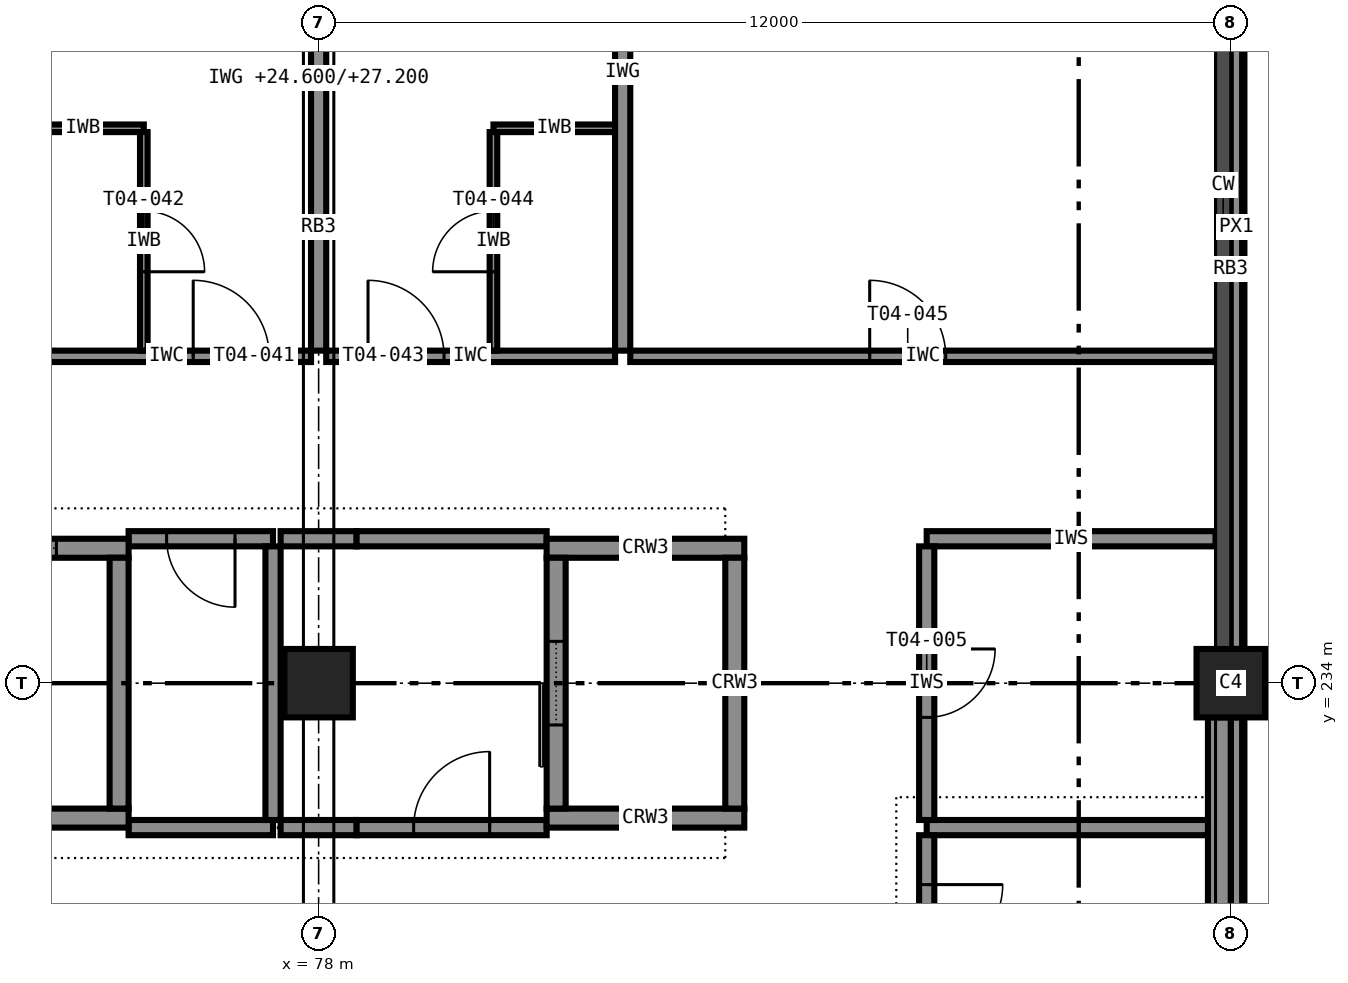
"""IFC4 building model, lengths in metres.
Left out: names, types, materials, properties, quantities, classifications, styles, units other than length and angle.
Written with IfcOpenShell. Run it as: python <this file> out.ifc"""

import sys

from ifc_helpers import new_model, si_unit, direction, frame, frame_2d, origin, origin_2d, place, context, subcontext, project, spatial, rectangle, extrude, element, fill, save


model = new_model("IFC4")
c1 = context("Model", 3, precision=1e-05, world=origin(), true_north=direction((0.0, 1.0)))
c2 = subcontext(c1, "Body", "Model", "MODEL_VIEW")
j1 = project(units=[si_unit("LENGTHUNIT", "METRE"), si_unit("PLANEANGLEUNIT", "RADIAN")], contexts=[c1])
p1 = place(None, origin())
s1 = spatial("IfcSite", under=j1, at=p1, CompositionType="ELEMENT")
p2 = place(p1, origin())
s2 = spatial("IfcBuilding", under=s1, at=p2, CompositionType="ELEMENT")
p3 = place(p2, frame((0.0, 0.0, 24.6)))
s3 = spatial("IfcBuildingStorey", under=s2, at=p3, CompositionType="ELEMENT", Elevation=24.6)
for number, where, z_axis, x_axis in (
    (1, (78.0, 234.0, 0.0), (0.0, 0.0, 1.0), (1.0, 0.0, 0.0)),
    (2, (90.0, 234.0, 0.0), (0.0, 0.0, 1.0), (1.0, 0.0, 0.0)),
):
    element("IfcColumn", number, at=place(p3, frame(where, z_axis=z_axis, x_axis=x_axis)), inside=s3, PredefinedType="COLUMN", context=c2, shape_type="SweptSolid", body=[
        extrude(rectangle(XDim=0.9, YDim=0.9, at=origin_2d()), origin(), (0.0, 0.0, 1.0), 3.6),
    ])
p4 = place(p3, frame((72.5, 232.225, 0.0), z_axis=(0.0, 0.0, 1.0), x_axis=(1.0, 0.0, 0.0)))
e3 = element("IfcWall", 3, at=p4, inside=s3, PredefinedType="SHEAR", context=c2, shape_type="SweptSolid", body=[
    extrude(rectangle(XDim=3.0, YDim=0.25, at=frame_2d((1.5, 0.0))), origin(), (0.0, 0.0, 1.0), 3.6),
])
p5 = place(p3, frame((72.5, 235.775, 0.0), z_axis=(0.0, 0.0, 1.0), x_axis=(1.0, 0.0, 0.0)))
e4 = element("IfcWall", 4, at=p5, inside=s3, PredefinedType="SHEAR", context=c2, shape_type="SweptSolid", body=[
    extrude(rectangle(XDim=3.0, YDim=0.25, at=frame_2d((1.5, 0.0))), origin(), (0.0, 0.0, 1.0), 3.6),
])
p6 = place(p5, frame((0.95, 0.0, 0.0)))
e5 = element("IfcOpeningElement", 5, at=p6, cuts=e4, PredefinedType="OPENING", context=c2, shape_type="SweptSolid", body=[
    extrude(rectangle(XDim=1.1, YDim=2.1, at=frame_2d((0.55, 1.05))), frame((0.0, 0.135, 0.0), z_axis=(0.0, -1.0, 0.0), x_axis=(1.0, 0.0, 0.0)), (0.0, 0.0, 1.0), 0.27),
])
p7 = place(p3, frame((75.375, 232.35, 0.0), z_axis=(0.0, 0.0, 1.0), x_axis=(0.0, 1.0, 0.0)))
e6 = element("IfcWall", 6, at=p7, inside=s3, PredefinedType="SHEAR", context=c2, shape_type="SweptSolid", body=[
    extrude(rectangle(XDim=3.3, YDim=0.25, at=frame_2d((1.65, 0.0))), origin(), (0.0, 0.0, 1.0), 3.6),
])
for number, where, z_axis, x_axis in (
    (7, (81.0, 232.225, 0.0), (0.0, 0.0, 1.0), (1.0, 0.0, 0.0)),
    (8, (81.0, 235.775, 0.0), (0.0, 0.0, 1.0), (1.0, 0.0, 0.0)),
):
    element("IfcWall", number, at=place(p3, frame(where, z_axis=z_axis, x_axis=x_axis)), inside=s3, PredefinedType="SHEAR", context=c2, shape_type="SweptSolid", body=[
        extrude(rectangle(XDim=2.6, YDim=0.25, at=frame_2d((1.3, 0.0))), origin(), (0.0, 0.0, 1.0), 3.6),
    ])
p8 = place(p3, frame((81.125, 232.35, 0.0), z_axis=(0.0, 0.0, 1.0), x_axis=(0.0, 1.0, 0.0)))
e9 = element("IfcWall", 9, at=p8, inside=s3, PredefinedType="SHEAR", context=c2, shape_type="SweptSolid", body=[
    extrude(rectangle(XDim=3.3, YDim=0.25, at=frame_2d((1.65, 0.0))), origin(), (0.0, 0.0, 1.0), 3.6),
])
p9 = place(p8, frame((1.1, 0.0, 0.0)))
e10 = element("IfcOpeningElement", 10, at=p9, cuts=e9, PredefinedType="OPENING", context=c2, shape_type="SweptSolid", body=[
    extrude(rectangle(XDim=1.1, YDim=2.1, at=frame_2d((0.55, 1.05))), frame((0.0, 0.135, 0.0), z_axis=(0.0, -1.0, 0.0), x_axis=(1.0, 0.0, 0.0)), (0.0, 0.0, 1.0), 0.27),
])
p10 = place(p3, frame((83.475, 232.35, 0.0), z_axis=(0.0, 0.0, 1.0), x_axis=(0.0, 1.0, 0.0)))
e11 = element("IfcWall", 11, at=p10, inside=s3, PredefinedType="SHEAR", context=c2, shape_type="SweptSolid", body=[
    extrude(rectangle(XDim=3.3, YDim=0.25, at=frame_2d((1.65, 0.0))), origin(), (0.0, 0.0, 1.0), 3.6),
])
p11 = place(p3, frame((89.85, 222.45, 0.0), z_axis=(0.0, 0.0, 1.0), x_axis=(0.0, 1.0, 0.0)))
e12 = element("IfcWall", 12, at=p11, inside=s3, PredefinedType="STANDARD", context=c2, shape_type="SweptSolid", body=[
    extrude(rectangle(XDim=11.1, YDim=0.3, at=frame_2d((5.55, 0.0))), origin(), (0.0, 0.0, 1.0), 2.6),
])
for number, where, z_axis, x_axis in (
    (13, (90.075, 222.45, 3.4), (0.0, 0.0, 1.0), (0.0, 1.0, 0.0)),
    (14, (90.075, 234.45, 3.4), (0.0, 0.0, 1.0), (0.0, 1.0, 0.0)),
):
    element("IfcWall", number, at=place(p3, frame(where, z_axis=z_axis, x_axis=x_axis)), inside=s3, PredefinedType="STANDARD", context=c2, shape_type="SweptSolid", body=[
        extrude(rectangle(XDim=11.1, YDim=0.15, at=frame_2d((5.55, 0.0))), origin(), (0.0, 0.0, 1.0), 0.2),
    ])
p12 = place(p3, frame((75.5, 232.1, 0.0), z_axis=(0.0, 0.0, 1.0), x_axis=(1.0, 0.0, 0.0)))
e15 = element("IfcWall", 15, at=p12, inside=s3, PredefinedType="PARTITIONING", context=c2, shape_type="SweptSolid", body=[
    extrude(rectangle(XDim=1.9, YDim=0.2, at=frame_2d((0.95, 0.0))), origin(), (0.0, 0.0, 1.0), 3.4),
])
p13 = place(p3, frame((77.5, 232.1, 0.0), z_axis=(0.0, 0.0, 1.0), x_axis=(1.0, 0.0, 0.0)))
e16 = element("IfcWall", 16, at=p13, inside=s3, PredefinedType="PARTITIONING", context=c2, shape_type="SweptSolid", body=[
    extrude(rectangle(XDim=1.0, YDim=0.2, at=frame_2d((0.5, 0.0))), origin(), (0.0, 0.0, 1.0), 3.4),
])
p14 = place(p3, frame((78.5, 232.1, 0.0), z_axis=(0.0, 0.0, 1.0), x_axis=(1.0, 0.0, 0.0)))
e17 = element("IfcWall", 17, at=p14, inside=s3, PredefinedType="PARTITIONING", context=c2, shape_type="SweptSolid", body=[
    extrude(rectangle(XDim=2.5, YDim=0.2, at=frame_2d((1.25, 0.0))), origin(), (0.0, 0.0, 1.0), 3.4),
])
p15 = place(p14, frame((0.75, 0.0, 0.0)))
e18 = element("IfcOpeningElement", 18, at=p15, cuts=e17, PredefinedType="OPENING", context=c2, shape_type="SweptSolid", body=[
    extrude(rectangle(XDim=1.0, YDim=2.1, at=frame_2d((0.5, 1.05))), frame((0.0, 0.11, 0.0), z_axis=(0.0, -1.0, 0.0), x_axis=(1.0, 0.0, 0.0)), (0.0, 0.0, 1.0), 0.22),
])
p16 = place(p3, frame((86.0, 232.1, 0.0), z_axis=(0.0, 0.0, 1.0), x_axis=(1.0, 0.0, 0.0)))
e19 = element("IfcWall", 19, at=p16, inside=s3, PredefinedType="PARTITIONING", context=c2, shape_type="SweptSolid", body=[
    extrude(rectangle(XDim=3.7, YDim=0.2, at=frame_2d((1.85, 0.0))), origin(), (0.0, 0.0, 1.0), 3.4),
])
p17 = place(p3, frame((77.4, 235.9, 0.0), z_axis=(0.0, 0.0, 1.0), x_axis=(-1.0, 0.0, 0.0)))
e20 = element("IfcWall", 20, at=p17, inside=s3, PredefinedType="PARTITIONING", context=c2, shape_type="SweptSolid", body=[
    extrude(rectangle(XDim=1.9, YDim=0.2, at=frame_2d((0.95, 0.0))), origin(), (0.0, 0.0, 1.0), 3.4),
])
p18 = place(p17, frame((0.5, 0.0, 0.0)))
e21 = element("IfcOpeningElement", 21, at=p18, cuts=e20, PredefinedType="OPENING", context=c2, shape_type="SweptSolid", body=[
    extrude(rectangle(XDim=0.9, YDim=2.1, at=frame_2d((0.45, 1.05))), frame((0.0, 0.11, 0.0), z_axis=(0.0, -1.0, 0.0), x_axis=(1.0, 0.0, 0.0)), (0.0, 0.0, 1.0), 0.22),
])
p19 = place(p3, frame((77.5, 235.9, 0.0), z_axis=(0.0, 0.0, 1.0), x_axis=(1.0, 0.0, 0.0)))
e22 = element("IfcWall", 22, at=p19, inside=s3, PredefinedType="PARTITIONING", context=c2, shape_type="SweptSolid", body=[
    extrude(rectangle(XDim=1.0, YDim=0.2, at=frame_2d((0.5, 0.0))), origin(), (0.0, 0.0, 1.0), 3.4),
])
p20 = place(p3, frame((78.5, 235.9, 0.0), z_axis=(0.0, 0.0, 1.0), x_axis=(1.0, 0.0, 0.0)))
e23 = element("IfcWall", 23, at=p20, inside=s3, PredefinedType="PARTITIONING", context=c2, shape_type="SweptSolid", body=[
    extrude(rectangle(XDim=2.5, YDim=0.2, at=frame_2d((1.25, 0.0))), origin(), (0.0, 0.0, 1.0), 3.4),
])
p21 = place(p3, frame((86.0, 235.9, 0.0), z_axis=(0.0, 0.0, 1.0), x_axis=(1.0, 0.0, 0.0)))
e24 = element("IfcWall", 24, at=p21, inside=s3, PredefinedType="PARTITIONING", context=c2, shape_type="SweptSolid", body=[
    extrude(rectangle(XDim=3.8, YDim=0.2, at=frame_2d((1.9, 0.0))), origin(), (0.0, 0.0, 1.0), 3.4),
])
p22 = place(p3, frame((77.4, 232.2, 0.0), z_axis=(0.0, 0.0, 1.0), x_axis=(0.0, 1.0, 0.0)))
e25 = element("IfcWall", 25, at=p22, inside=s3, PredefinedType="PARTITIONING", context=c2, shape_type="SweptSolid", body=[
    extrude(rectangle(XDim=3.6, YDim=0.2, at=frame_2d((1.8, 0.0))), origin(), (0.0, 0.0, 1.0), 3.4),
])
p23 = place(p3, frame((86.0, 235.8, 0.0), z_axis=(0.0, 0.0, 1.0), x_axis=(0.0, -1.0, 0.0)))
e26 = element("IfcWall", 26, at=p23, inside=s3, PredefinedType="PARTITIONING", context=c2, shape_type="SweptSolid", body=[
    extrude(rectangle(XDim=3.6, YDim=0.2, at=frame_2d((1.8, 0.0))), origin(), (0.0, 0.0, 1.0), 3.4),
])
p24 = place(p23, frame((1.35, 0.0, 0.0)))
e27 = element("IfcOpeningElement", 27, at=p24, cuts=e26, PredefinedType="OPENING", context=c2, shape_type="SweptSolid", body=[
    extrude(rectangle(XDim=0.9, YDim=2.1, at=frame_2d((0.45, 1.05))), frame((0.0, 0.11, 0.0), z_axis=(0.0, -1.0, 0.0), x_axis=(1.0, 0.0, 0.0)), (0.0, 0.0, 1.0), 0.22),
])
p25 = place(p3, frame((86.0, 232.0, 0.0), z_axis=(0.0, 0.0, 1.0), x_axis=(0.0, -1.0, 0.0)))
e28 = element("IfcWall", 28, at=p25, inside=s3, PredefinedType="PARTITIONING", context=c2, shape_type="SweptSolid", body=[
    extrude(rectangle(XDim=2.3, YDim=0.2, at=frame_2d((1.15, 0.0))), origin(), (0.0, 0.0, 1.0), 3.4),
])
p26 = place(p25, frame((0.65, 0.0, 0.0)))
e29 = element("IfcOpeningElement", 29, at=p26, cuts=e28, PredefinedType="OPENING", context=c2, shape_type="SweptSolid", body=[
    extrude(rectangle(XDim=1.0, YDim=2.1, at=frame_2d((0.5, 1.05))), frame((0.0, 0.11, 0.0), z_axis=(0.0, -1.0, 0.0), x_axis=(1.0, 0.0, 0.0)), (0.0, 0.0, 1.0), 0.22),
])
p27 = place(p3, frame((74.1, 238.3, 0.0), z_axis=(0.0, 0.0, 1.0), x_axis=(1.0, 0.0, 0.0)))
e30 = element("IfcWall", 30, at=p27, inside=s3, PredefinedType="PARTITIONING", context=c2, shape_type="SweptSolid", body=[
    extrude(rectangle(XDim=3.8, YDim=0.15, at=frame_2d((1.9, 0.0))), origin(), (0.0, 0.0, 1.0), 3.4),
])
p28 = place(p27, frame((2.25, 0.0, 0.0)))
e31 = element("IfcOpeningElement", 31, at=p28, cuts=e30, PredefinedType="OPENING", context=c2, shape_type="SweptSolid", body=[
    extrude(rectangle(XDim=1.0, YDim=2.1, at=frame_2d((0.5, 1.05))), frame((0.0, 0.085, 0.0), z_axis=(0.0, -1.0, 0.0), x_axis=(1.0, 0.0, 0.0)), (0.0, 0.0, 1.0), 0.17),
])
p29 = place(p3, frame((74.1, 241.3, 0.0), z_axis=(0.0, 0.0, 1.0), x_axis=(1.0, 0.0, 0.0)))
e32 = element("IfcWall", 32, at=p29, inside=s3, PredefinedType="PARTITIONING", context=c2, shape_type="SweptSolid", body=[
    extrude(rectangle(XDim=1.6, YDim=0.1, at=frame_2d((0.8, 0.0))), origin(), (0.0, 0.0, 1.0), 3.4),
])
p30 = place(p3, frame((75.7, 241.25, 0.0), z_axis=(0.0, 0.0, 1.0), x_axis=(0.0, -1.0, 0.0)))
e33 = element("IfcWall", 33, at=p30, inside=s3, PredefinedType="PARTITIONING", context=c2, shape_type="SweptSolid", body=[
    extrude(rectangle(XDim=2.875, YDim=0.1, at=frame_2d((1.438, 0.0))), origin(), (0.0, 0.0, 1.0), 3.4),
])
p31 = place(p30, frame((1.038, 0.0, 0.0)))
e34 = element("IfcOpeningElement", 34, at=p31, cuts=e33, PredefinedType="OPENING", context=c2, shape_type="SweptSolid", body=[
    extrude(rectangle(XDim=0.8, YDim=2.1, at=frame_2d((0.4, 1.05))), frame((0.0, 0.06, 0.0), z_axis=(0.0, -1.0, 0.0), x_axis=(1.0, 0.0, 0.0)), (0.0, 0.0, 1.0), 0.12),
])
p32 = place(p3, frame((78.1, 238.3, 0.0), z_axis=(0.0, 0.0, 1.0), x_axis=(1.0, 0.0, 0.0)))
e35 = element("IfcWall", 35, at=p32, inside=s3, PredefinedType="PARTITIONING", context=c2, shape_type="SweptSolid", body=[
    extrude(rectangle(XDim=3.8, YDim=0.15, at=frame_2d((1.9, 0.0))), origin(), (0.0, 0.0, 1.0), 3.4),
])
p33 = place(p32, frame((0.55, 0.0, 0.0)))
e36 = element("IfcOpeningElement", 36, at=p33, cuts=e35, PredefinedType="OPENING", context=c2, shape_type="SweptSolid", body=[
    extrude(rectangle(XDim=1.0, YDim=2.1, at=frame_2d((0.5, 1.05))), frame((0.0, 0.085, 0.0), z_axis=(0.0, -1.0, 0.0), x_axis=(1.0, 0.0, 0.0)), (0.0, 0.0, 1.0), 0.17),
])
p34 = place(p3, frame((80.3, 241.3, 0.0), z_axis=(0.0, 0.0, 1.0), x_axis=(1.0, 0.0, 0.0)))
e37 = element("IfcWall", 37, at=p34, inside=s3, PredefinedType="PARTITIONING", context=c2, shape_type="SweptSolid", body=[
    extrude(rectangle(XDim=1.6, YDim=0.1, at=frame_2d((0.8, 0.0))), origin(), (0.0, 0.0, 1.0), 3.4),
])
p35 = place(p3, frame((80.3, 238.375, 0.0), z_axis=(0.0, 0.0, 1.0), x_axis=(0.0, 1.0, 0.0)))
e38 = element("IfcWall", 38, at=p35, inside=s3, PredefinedType="PARTITIONING", context=c2, shape_type="SweptSolid", body=[
    extrude(rectangle(XDim=2.875, YDim=0.1, at=frame_2d((1.438, 0.0))), origin(), (0.0, 0.0, 1.0), 3.4),
])
p36 = place(p35, frame((1.038, 0.0, 0.0)))
e39 = element("IfcOpeningElement", 39, at=p36, cuts=e38, PredefinedType="OPENING", context=c2, shape_type="SweptSolid", body=[
    extrude(rectangle(XDim=0.8, YDim=2.1, at=frame_2d((0.4, 1.05))), frame((0.0, 0.06, 0.0), z_axis=(0.0, -1.0, 0.0), x_axis=(1.0, 0.0, 0.0)), (0.0, 0.0, 1.0), 0.12),
])
p37 = place(p3, frame((82.1, 238.3, 0.0), z_axis=(0.0, 0.0, 1.0), x_axis=(1.0, 0.0, 0.0)))
e40 = element("IfcWall", 40, at=p37, inside=s3, PredefinedType="PARTITIONING", context=c2, shape_type="SweptSolid", body=[
    extrude(rectangle(XDim=7.7, YDim=0.15, at=frame_2d((3.85, 0.0))), origin(), (0.0, 0.0, 1.0), 3.4),
])
p38 = place(p37, frame((3.15, 0.0, 0.0)))
e41 = element("IfcOpeningElement", 41, at=p38, cuts=e40, PredefinedType="OPENING", context=c2, shape_type="SweptSolid", body=[
    extrude(rectangle(XDim=1.0, YDim=2.1, at=frame_2d((0.5, 1.05))), frame((0.0, 0.085, 0.0), z_axis=(0.0, -1.0, 0.0), x_axis=(1.0, 0.0, 0.0)), (0.0, 0.0, 1.0), 0.17),
])
p39 = place(p3, frame((78.0, 245.55, 0.0), z_axis=(0.0, 0.0, 1.0), x_axis=(0.0, -1.0, 0.0)))
e42 = element("IfcWall", 42, at=p39, inside=s3, PredefinedType="PARTITIONING", context=c2, shape_type="SweptSolid", body=[
    extrude(rectangle(XDim=7.175, YDim=0.2, at=frame_2d((3.587, 0.0))), origin(), (0.0, 0.0, 1.0), 2.6),
])
p40 = place(p3, frame((82.0, 245.7, 0.0), z_axis=(0.0, 0.0, 1.0), x_axis=(0.0, -1.0, 0.0)))
e43 = element("IfcWall", 43, at=p40, inside=s3, PredefinedType="PARTITIONING", context=c2, shape_type="SweptSolid", body=[
    extrude(rectangle(XDim=7.325, YDim=0.2, at=frame_2d((3.663, 0.0))), origin(), (0.0, 0.0, 1.0), 3.4),
])
p41 = place(p18, origin())
e44 = element("IfcDoor", 44, at=p41, inside=s3, OperationType="SINGLE_SWING_LEFT", PredefinedType="DOOR", context=c2, shape_type="SweptSolid", body=[
    extrude(rectangle(XDim=0.9, YDim=2.1, at=frame_2d((0.45, 1.05))), frame((0.0, 0.025, 0.0), z_axis=(0.0, -1.0, 0.0), x_axis=(1.0, 0.0, 0.0)), (0.0, 0.0, 1.0), 0.05),
])
fill(e21, e44)
p42 = place(p15, origin())
e45 = element("IfcDoor", 45, at=p42, inside=s3, OperationType="SINGLE_SWING_RIGHT", PredefinedType="DOOR", context=c2, shape_type="SweptSolid", body=[
    extrude(rectangle(XDim=1.0, YDim=2.1, at=frame_2d((0.5, 1.05))), frame((0.0, 0.025, 0.0), z_axis=(0.0, -1.0, 0.0), x_axis=(1.0, 0.0, 0.0)), (0.0, 0.0, 1.0), 0.05),
])
fill(e18, e45)
p43 = place(p24, origin())
e46 = element("IfcDoor", 46, at=p43, inside=s3, OperationType="SINGLE_SWING_LEFT", PredefinedType="DOOR", context=c2, shape_type="SweptSolid", body=[
    extrude(rectangle(XDim=0.9, YDim=2.1, at=frame_2d((0.45, 1.05))), frame((0.0, 0.025, 0.0), z_axis=(0.0, -1.0, 0.0), x_axis=(1.0, 0.0, 0.0)), (0.0, 0.0, 1.0), 0.05),
])
fill(e27, e46)
p44 = place(p26, origin())
e47 = element("IfcDoor", 47, at=p44, inside=s3, OperationType="SINGLE_SWING_LEFT", PredefinedType="DOOR", context=c2, shape_type="SweptSolid", body=[
    extrude(rectangle(XDim=1.0, YDim=2.1, at=frame_2d((0.5, 1.05))), frame((0.0, 0.025, 0.0), z_axis=(0.0, -1.0, 0.0), x_axis=(1.0, 0.0, 0.0)), (0.0, 0.0, 1.0), 0.05),
])
fill(e29, e47)
p45 = place(p28, origin())
e48 = element("IfcDoor", 48, at=p45, inside=s3, OperationType="SINGLE_SWING_LEFT", PredefinedType="DOOR", context=c2, shape_type="SweptSolid", body=[
    extrude(rectangle(XDim=1.0, YDim=2.1, at=frame_2d((0.5, 1.05))), frame((0.0, 0.025, 0.0), z_axis=(0.0, -1.0, 0.0), x_axis=(1.0, 0.0, 0.0)), (0.0, 0.0, 1.0), 0.05),
])
fill(e31, e48)
p46 = place(p31, origin())
e49 = element("IfcDoor", 49, at=p46, inside=s3, OperationType="SINGLE_SWING_RIGHT", PredefinedType="DOOR", context=c2, shape_type="SweptSolid", body=[
    extrude(rectangle(XDim=0.8, YDim=2.1, at=frame_2d((0.4, 1.05))), frame((0.0, 0.025, 0.0), z_axis=(0.0, -1.0, 0.0), x_axis=(1.0, 0.0, 0.0)), (0.0, 0.0, 1.0), 0.05),
])
fill(e34, e49)
p47 = place(p33, origin())
e50 = element("IfcDoor", 50, at=p47, inside=s3, OperationType="SINGLE_SWING_LEFT", PredefinedType="DOOR", context=c2, shape_type="SweptSolid", body=[
    extrude(rectangle(XDim=1.0, YDim=2.1, at=frame_2d((0.5, 1.05))), frame((0.0, 0.025, 0.0), z_axis=(0.0, -1.0, 0.0), x_axis=(1.0, 0.0, 0.0)), (0.0, 0.0, 1.0), 0.05),
])
fill(e36, e50)
p48 = place(p36, origin())
e51 = element("IfcDoor", 51, at=p48, inside=s3, OperationType="SINGLE_SWING_LEFT", PredefinedType="DOOR", context=c2, shape_type="SweptSolid", body=[
    extrude(rectangle(XDim=0.8, YDim=2.1, at=frame_2d((0.4, 1.05))), frame((0.0, 0.025, 0.0), z_axis=(0.0, -1.0, 0.0), x_axis=(1.0, 0.0, 0.0)), (0.0, 0.0, 1.0), 0.05),
])
fill(e39, e51)
p49 = place(p38, origin())
e52 = element("IfcDoor", 52, at=p49, inside=s3, OperationType="SINGLE_SWING_LEFT", PredefinedType="DOOR", context=c2, shape_type="SweptSolid", body=[
    extrude(rectangle(XDim=1.0, YDim=2.1, at=frame_2d((0.5, 1.05))), frame((0.0, 0.025, 0.0), z_axis=(0.0, -1.0, 0.0), x_axis=(1.0, 0.0, 0.0)), (0.0, 0.0, 1.0), 0.05),
])
fill(e41, e52)
p50 = place(p6, origin())
e53 = element("IfcDoor", 53, at=p50, inside=s3, OperationType="SLIDING_TO_LEFT", PredefinedType="DOOR", context=c2, shape_type="SweptSolid", body=[
    extrude(rectangle(XDim=1.1, YDim=2.1, at=frame_2d((0.55, 1.05))), frame((0.0, 0.025, 0.0), z_axis=(0.0, -1.0, 0.0), x_axis=(1.0, 0.0, 0.0)), (0.0, 0.0, 1.0), 0.05),
])
fill(e5, e53)
p51 = place(p9, origin())
e54 = element("IfcDoor", 54, at=p51, inside=s3, OperationType="SLIDING_TO_LEFT", PredefinedType="DOOR", context=c2, shape_type="SweptSolid", body=[
    extrude(rectangle(XDim=1.1, YDim=2.1, at=frame_2d((0.55, 1.05))), frame((0.0, 0.025, 0.0), z_axis=(0.0, -1.0, 0.0), x_axis=(1.0, 0.0, 0.0)), (0.0, 0.0, 1.0), 0.05),
])
fill(e10, e54)
save(model, sys.argv[1])
